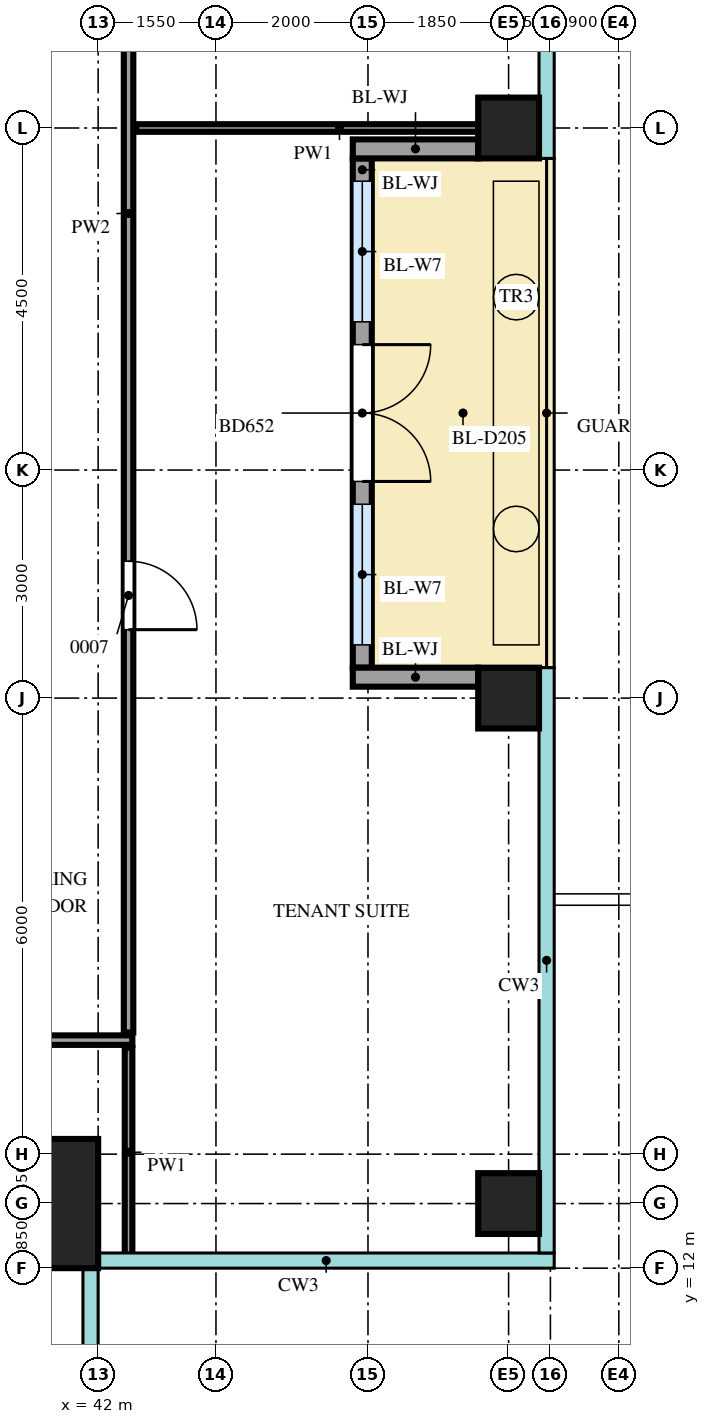
"""IFC4 building model, lengths in metres.
Left out: names, types, materials, properties, quantities, classifications, styles, units other than length and angle.
Written with IfcOpenShell. Run it as: python <this file> out.ifc"""

import sys

from ifc_helpers import new_model, si_unit, direction, frame, frame_2d, origin, origin_2d, place, context, subcontext, project, spatial, rectangle, extrude, source, transform, mapped, element, fill, save


model = new_model("IFC4")
c1 = context("Model", 3, precision=1e-05, world=origin(), true_north=direction((0.0, 1.0)))
c2 = subcontext(c1, "Body", "Model", "MODEL_VIEW")
j1 = project(units=[si_unit("LENGTHUNIT", "METRE"), si_unit("PLANEANGLEUNIT", "RADIAN")], contexts=[c1])
p1 = place(None, origin())
s1 = spatial("IfcSite", under=j1, at=p1, CompositionType="ELEMENT")
p2 = place(p1, origin())
s2 = spatial("IfcBuilding", under=s1, at=p2, CompositionType="ELEMENT")
p3 = place(p2, frame((0.0, 0.0, 290.2)))
s3 = spatial("IfcBuildingStorey", under=s2, at=p3, CompositionType="ELEMENT", Elevation=290.2)
m1 = source(origin(), c2, "Body", "SweptSolid", [
    extrude(rectangle(XDim=1.7, YDim=1.7, at=origin_2d()), origin(), (0.0, 0.0, 1.0), 3.75),
])
p4 = place(p3, frame((41.15, 12.85, 0.0), z_axis=(0.0, 0.0, 1.0), x_axis=(1.0, 0.0, 0.0)))
e1 = element("IfcColumn", 1, at=p4, inside=s3, PredefinedType="COLUMN", context=c2, shape_type="MappedRepresentation", body=[
    mapped(m1, transform((0.0, 0.0, 0.0))),
])
m2 = source(origin(), c2, "Body", "SweptSolid", [
    extrude(rectangle(XDim=0.8, YDim=0.8, at=origin_2d()), origin(), (0.0, 0.0, 1.0), 3.75),
])
for number, where, z_axis, x_axis in (
    (2, (47.4, 12.85, 0.0), (0.0, 0.0, 1.0), (1.0, 0.0, 0.0)),
    (3, (47.4, 19.5, 0.0), (0.0, 0.0, 1.0), (1.0, 0.0, 0.0)),
    (4, (47.4, 27.0, 0.0), (0.0, 0.0, 1.0), (1.0, 0.0, 0.0)),
):
    element("IfcColumn", number, at=place(p3, frame(where, z_axis=z_axis, x_axis=x_axis)), inside=s3, PredefinedType="COLUMN", context=c2, shape_type="MappedRepresentation", body=[
        mapped(m2, transform((0.0, 0.0, 0.0))),
    ])
m3 = source(origin(), c2, "Body", "SweptSolid", [
    extrude(rectangle(XDim=6.7, YDim=0.25, at=frame_2d((3.35, 0.0))), origin(), (0.0, 0.0, 1.0), 3.2),
])
p5 = place(p3, frame((45.475, 19.9, 0.0), z_axis=(0.0, 0.0, 1.0), x_axis=(0.0, 1.0, 0.0)))
e5 = element("IfcWall", 5, at=p5, inside=s3, PredefinedType="SOLIDWALL", context=c2, shape_type="MappedRepresentation", body=[
    mapped(m3, transform((0.0, 0.0, 0.0))),
])
m4 = source(origin(), c2, "Body", "SweptSolid", [
    extrude(rectangle(XDim=1.85, YDim=2.4, at=frame_2d((0.925, 1.2))), frame((0.0, 0.135, 0.0), z_axis=(0.0, -1.0, 0.0), x_axis=(1.0, 0.0, 0.0)), (0.0, 0.0, 1.0), 0.27),
])
p6 = place(p5, frame((0.3, 0.0, 0.0)))
e6 = element("IfcOpeningElement", 6, at=p6, cuts=e5, PredefinedType="OPENING", context=c2, shape_type="MappedRepresentation", body=[
    mapped(m4, transform((0.0, 0.0, 0.0))),
])
p7 = place(p5, frame((4.55, 0.0, 0.0)))
e7 = element("IfcOpeningElement", 7, at=p7, cuts=e5, PredefinedType="OPENING", context=c2, shape_type="MappedRepresentation", body=[
    mapped(m4, transform((0.0, 0.0, 0.0))),
])
m5 = source(origin(), c2, "Body", "SweptSolid", [
    extrude(rectangle(XDim=1.8, YDim=2.4, at=frame_2d((0.9, 1.2))), frame((0.0, 0.135, 0.0), z_axis=(0.0, -1.0, 0.0), x_axis=(1.0, 0.0, 0.0)), (0.0, 0.0, 1.0), 0.27),
])
p8 = place(p5, frame((2.45, 0.0, 0.0)))
e8 = element("IfcOpeningElement", 8, at=p8, cuts=e5, PredefinedType="OPENING", context=c2, shape_type="MappedRepresentation", body=[
    mapped(m5, transform((0.0, 0.0, 0.0))),
])
m6 = source(origin(), c2, "Body", "SweptSolid", [
    extrude(rectangle(XDim=1.65, YDim=0.25, at=frame_2d((0.825, 0.0))), origin(), (0.0, 0.0, 1.0), 3.2),
])
for number, where, z_axis, x_axis in (
    (9, (47.0, 19.775, 0.0), (0.0, 0.0, 1.0), (-1.0, 0.0, 0.0)),
    (10, (47.0, 26.725, 0.0), (0.0, 0.0, 1.0), (-1.0, 0.0, 0.0)),
):
    element("IfcWall", number, at=place(p3, frame(where, z_axis=z_axis, x_axis=x_axis)), inside=s3, PredefinedType="SOLIDWALL", context=c2, shape_type="MappedRepresentation", body=[
        mapped(m6, transform((0.0, 0.0, 0.0))),
    ])
m7 = source(origin(), c2, "Body", "SweptSolid", [
    extrude(rectangle(XDim=2.75, YDim=0.1, at=frame_2d((1.375, 0.0))), origin(), (0.0, 0.0, 1.0), 3.8),
])
p9 = place(p3, frame((42.4, 12.15, 0.0), z_axis=(0.0, 0.0, 1.0), x_axis=(0.0, 1.0, 0.0)))
e11 = element("IfcWall", 11, at=p9, inside=s3, PredefinedType="PARTITIONING", context=c2, shape_type="MappedRepresentation", body=[
    mapped(m7, transform((0.0, 0.0, 0.0))),
])
m8 = source(origin(), c2, "Body", "SweptSolid", [
    extrude(rectangle(XDim=19.1, YDim=0.125, at=frame_2d((9.55, 0.0))), origin(), (0.0, 0.0, 1.0), 3.8),
])
p10 = place(p3, frame((23.35, 15.0, 0.0), z_axis=(0.0, 0.0, 1.0), x_axis=(1.0, 0.0, 0.0)))
e12 = element("IfcWall", 12, at=p10, inside=s3, PredefinedType="PARTITIONING", context=c2, shape_type="MappedRepresentation", body=[
    mapped(m8, transform((0.0, 0.0, 0.0))),
])
m9 = source(origin(), c2, "Body", "SweptSolid", [
    extrude(rectangle(XDim=0.9, YDim=2.1, at=frame_2d((0.45, 1.05))), frame((0.0, 0.073, 0.0), z_axis=(0.0, -1.0, 0.0), x_axis=(1.0, 0.0, 0.0)), (0.0, 0.0, 1.0), 0.145),
])
p11 = place(p10, frame((7.1, 0.0, 0.0)))
e13 = element("IfcOpeningElement", 13, at=p11, cuts=e12, PredefinedType="OPENING", context=c2, shape_type="MappedRepresentation", body=[
    mapped(m9, transform((0.0, 0.0, 0.0))),
])
p12 = place(p10, frame((13.3, 0.0, 0.0)))
e14 = element("IfcOpeningElement", 14, at=p12, cuts=e12, PredefinedType="OPENING", context=c2, shape_type="MappedRepresentation", body=[
    mapped(m9, transform((0.0, 0.0, 0.0))),
])
m10 = source(origin(), c2, "Body", "SweptSolid", [
    extrude(rectangle(XDim=23.8, YDim=0.125, at=frame_2d((11.9, 0.0))), origin(), (0.0, 0.0, 1.0), 3.8),
])
p13 = place(p3, frame((42.4, 15.1, 0.0), z_axis=(0.0, 0.0, 1.0), x_axis=(0.0, 1.0, 0.0)))
e15 = element("IfcWall", 15, at=p13, inside=s3, PredefinedType="PARTITIONING", context=c2, shape_type="MappedRepresentation", body=[
    mapped(m10, transform((0.0, 0.0, 0.0))),
])
p14 = place(p13, frame((5.3, 0.0, 0.0)))
e16 = element("IfcOpeningElement", 16, at=p14, cuts=e15, PredefinedType="OPENING", context=c2, shape_type="MappedRepresentation", body=[
    mapped(m9, transform((0.0, 0.0, 0.0))),
])
p15 = place(p13, frame((15.35, 0.0, 0.0)))
e17 = element("IfcOpeningElement", 17, at=p15, cuts=e15, PredefinedType="OPENING", context=c2, shape_type="MappedRepresentation", body=[
    mapped(m9, transform((0.0, 0.0, 0.0))),
])
p16 = place(p13, frame((21.05, 0.0, 0.0)))
e18 = element("IfcOpeningElement", 18, at=p16, cuts=e15, PredefinedType="OPENING", context=c2, shape_type="MappedRepresentation", body=[
    mapped(m9, transform((0.0, 0.0, 0.0))),
])
m11 = source(origin(), c2, "Body", "SweptSolid", [
    extrude(rectangle(XDim=5.35, YDim=0.1, at=frame_2d((2.675, 0.0))), origin(), (0.0, 0.0, 1.0), 3.8),
])
p17 = place(p3, frame((42.5, 27.0, 0.0), z_axis=(0.0, 0.0, 1.0), x_axis=(1.0, 0.0, 0.0)))
e19 = element("IfcWall", 19, at=p17, inside=s3, PredefinedType="PARTITIONING", context=c2, shape_type="MappedRepresentation", body=[
    mapped(m11, transform((0.0, 0.0, 0.0))),
])
m12 = source(origin(), c2, "Body", "SweptSolid", [
    extrude(rectangle(XDim=1.85, YDim=2.4, at=frame_2d((0.925, 1.2))), frame((0.0, 0.03, 0.0), z_axis=(0.0, -1.0, 0.0), x_axis=(1.0, 0.0, 0.0)), (0.0, 0.0, 1.0), 0.06),
])
p18 = place(p6, origin())
e20 = element("IfcWindow", 20, at=p18, inside=s3, PartitioningType="SINGLE_PANEL", PredefinedType="WINDOW", context=c2, shape_type="MappedRepresentation", body=[
    mapped(m12, transform((0.0, 0.0, 0.0))),
])
fill(e6, e20)
p19 = place(p7, origin())
e21 = element("IfcWindow", 21, at=p19, inside=s3, PartitioningType="SINGLE_PANEL", PredefinedType="WINDOW", context=c2, shape_type="MappedRepresentation", body=[
    mapped(m12, transform((0.0, 0.0, 0.0))),
])
fill(e7, e21)
m13 = source(origin(), c2, "Body", "SweptSolid", [
    extrude(rectangle(XDim=1.8, YDim=2.4, at=frame_2d((0.9, 1.2))), frame((0.0, 0.025, 0.0), z_axis=(0.0, -1.0, 0.0), x_axis=(1.0, 0.0, 0.0)), (0.0, 0.0, 1.0), 0.05),
])
p20 = place(p8, origin())
e22 = element("IfcDoor", 22, at=p20, inside=s3, OperationType="DOUBLE_DOOR_DOUBLE_SWING", PredefinedType="DOOR", context=c2, shape_type="MappedRepresentation", body=[
    mapped(m13, transform((0.0, 0.0, 0.0))),
])
fill(e8, e22)
m14 = source(origin(), c2, "Body", "SweptSolid", [
    extrude(rectangle(XDim=0.9, YDim=2.1, at=frame_2d((0.45, 1.05))), frame((0.0, 0.025, 0.0), z_axis=(0.0, -1.0, 0.0), x_axis=(1.0, 0.0, 0.0)), (0.0, 0.0, 1.0), 0.05),
])
p21 = place(p14, origin())
e23 = element("IfcDoor", 23, at=p21, inside=s3, OperationType="SINGLE_SWING_LEFT", PredefinedType="DOOR", context=c2, shape_type="MappedRepresentation", body=[
    mapped(m14, transform((0.0, 0.0, 0.0))),
])
fill(e16, e23)
save(model, sys.argv[1])
